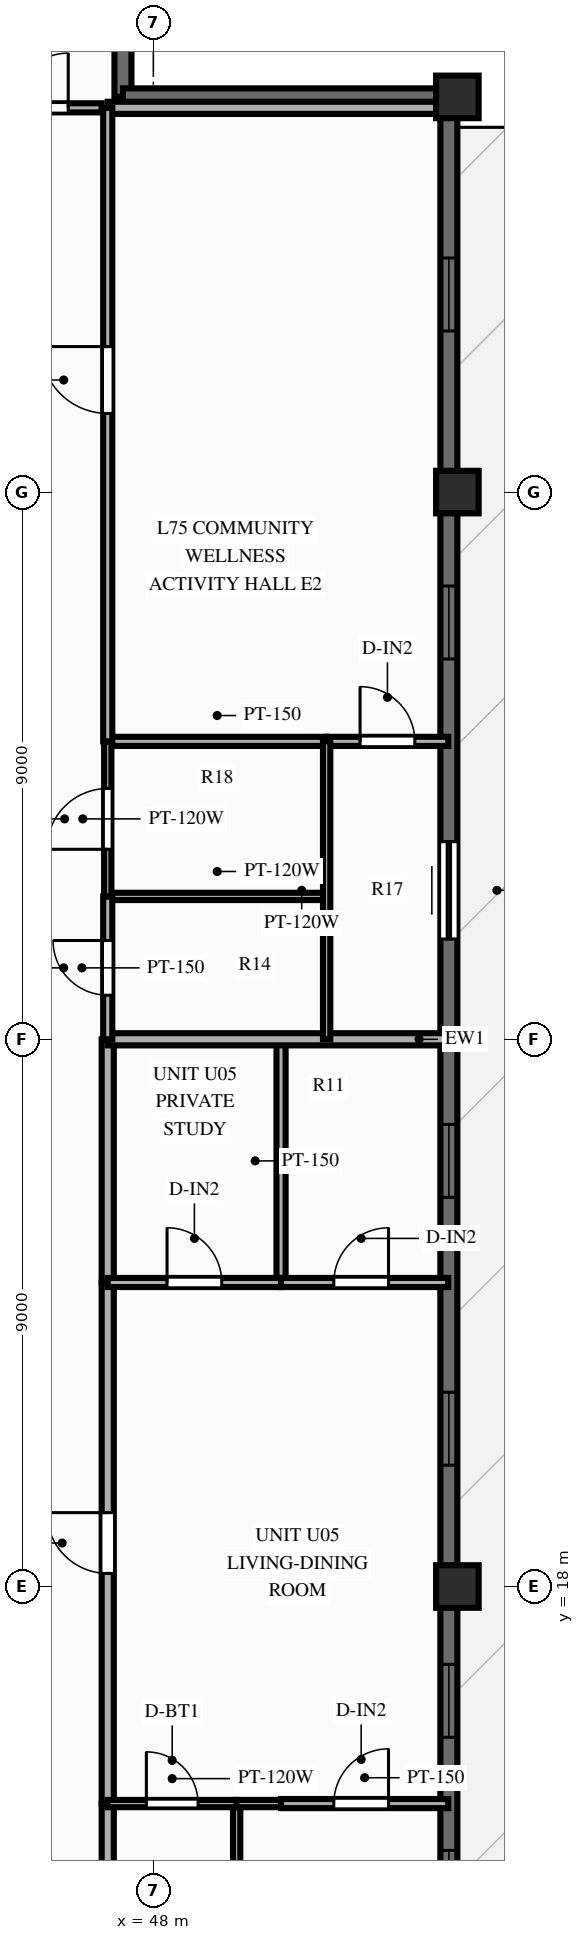
"""IFC4 building model, lengths in metres.
Left out: names, types, materials, properties, quantities, classifications, styles, units other than length and angle.
Written with IfcOpenShell. Run it as: python <this file> out.ifc"""

import sys

from ifc_helpers import new_model, si_unit, direction, frame, frame_2d, origin, origin_2d, place, context, subcontext, project, spatial, rectangle, extrude, source, transform, mapped, element, fill, save


model = new_model("IFC4")
c1 = context("Model", 3, precision=1e-05, world=origin(), true_north=direction((0.0, 1.0)))
c2 = subcontext(c1, "Body", "Model", "MODEL_VIEW")
j1 = project(units=[si_unit("LENGTHUNIT", "METRE"), si_unit("PLANEANGLEUNIT", "RADIAN")], contexts=[c1])
p1 = place(None, origin())
s1 = spatial("IfcSite", under=j1, at=p1, CompositionType="ELEMENT")
p2 = place(p1, origin())
s2 = spatial("IfcBuilding", under=s1, at=p2, CompositionType="ELEMENT")
p3 = place(p2, frame((0.0, 0.0, 243.0)))
s3 = spatial("IfcBuildingStorey", under=s2, at=p3, CompositionType="ELEMENT", Elevation=243.0)
m1 = source(origin(), c2, "Body", "SweptSolid", [
    extrude(rectangle(XDim=0.7, YDim=0.7, at=origin_2d()), origin(), (0.0, 0.0, 1.0), 3.0),
])
for number, where, z_axis, x_axis in (
    (1, (53.0, 18.0, 0.0), (0.0, 0.0, 1.0), (1.0, 0.0, 0.0)),
    (2, (53.0, 36.0, 0.0), (0.0, 0.0, 1.0), (1.0, 0.0, 0.0)),
    (3, (53.0, 42.5, 0.0), (0.0, 0.0, 1.0), (1.0, 0.0, 0.0)),
):
    element("IfcColumn", number, at=place(p3, frame(where, z_axis=z_axis, x_axis=x_axis)), inside=s3, PredefinedType="COLUMN", context=c2, shape_type="MappedRepresentation", body=[
        mapped(m1, transform((0.0, 0.0, 0.0), scale=1.0)),
    ])
p4 = place(p3, frame((52.86, 11.5, 0.0), z_axis=(0.0, 0.0, 1.0), x_axis=(0.0, 1.0, 0.0)))
e4 = element("IfcWall", 4, at=p4, inside=s3, PredefinedType="SOLIDWALL", context=c2, shape_type="SweptSolid", body=[
    extrude(rectangle(XDim=31.0, YDim=0.28, at=frame_2d((15.5, 0.0))), origin(), (0.0, 0.0, 1.0), 2.28),
])
p5 = place(p4, frame((0.96, 0.0, 0.25)))
e5 = element("IfcOpeningElement", 5, at=p5, cuts=e4, PredefinedType="OPENING", context=c2, shape_type="SweptSolid", body=[
    extrude(rectangle(XDim=1.2, YDim=1.5, at=frame_2d((0.6, 0.75))), frame((0.0, 0.152, 0.0), z_axis=(0.0, -1.0, 0.0), x_axis=(1.0, 0.0, 0.0)), (0.0, 0.0, 1.0), 0.304),
])
p6 = place(p4, frame((4.02, 0.0, 0.25)))
e6 = element("IfcOpeningElement", 6, at=p6, cuts=e4, PredefinedType="OPENING", context=c2, shape_type="SweptSolid", body=[
    extrude(rectangle(XDim=1.2, YDim=1.5, at=frame_2d((0.6, 0.75))), frame((0.0, 0.152, 0.0), z_axis=(0.0, -1.0, 0.0), x_axis=(1.0, 0.0, 0.0)), (0.0, 0.0, 1.0), 0.304),
])
p7 = place(p4, frame((8.495, 0.0, 0.25)))
e7 = element("IfcOpeningElement", 7, at=p7, cuts=e4, PredefinedType="OPENING", context=c2, shape_type="SweptSolid", body=[
    extrude(rectangle(XDim=1.2, YDim=1.5, at=frame_2d((0.6, 0.75))), frame((0.0, 0.152, 0.0), z_axis=(0.0, -1.0, 0.0), x_axis=(1.0, 0.0, 0.0)), (0.0, 0.0, 1.0), 0.304),
])
p8 = place(p4, frame((12.9, 0.0, 0.25)))
e8 = element("IfcOpeningElement", 8, at=p8, cuts=e4, PredefinedType="OPENING", context=c2, shape_type="SweptSolid", body=[
    extrude(rectangle(XDim=1.2, YDim=1.5, at=frame_2d((0.6, 0.75))), frame((0.0, 0.152, 0.0), z_axis=(0.0, -1.0, 0.0), x_axis=(1.0, 0.0, 0.0)), (0.0, 0.0, 1.0), 0.304),
])
p9 = place(p4, frame((18.75, 0.0, 0.0), z_axis=(0.0, 0.0, 1.0), x_axis=(-1.0, 0.0, 0.0)))
e9 = element("IfcOpeningElement", 9, at=p9, cuts=e4, PredefinedType="OPENING", context=c2, shape_type="SweptSolid", body=[
    extrude(rectangle(XDim=1.6, YDim=2.15, at=frame_2d((0.8, 1.075))), frame((0.0, 0.152, 0.0), z_axis=(0.0, -1.0, 0.0), x_axis=(1.0, 0.0, 0.0)), (0.0, 0.0, 1.0), 0.304),
])
p10 = place(p4, frame((21.755, 0.0, 0.25)))
e10 = element("IfcOpeningElement", 10, at=p10, cuts=e4, PredefinedType="OPENING", context=c2, shape_type="SweptSolid", body=[
    extrude(rectangle(XDim=1.2, YDim=1.5, at=frame_2d((0.6, 0.75))), frame((0.0, 0.152, 0.0), z_axis=(0.0, -1.0, 0.0), x_axis=(1.0, 0.0, 0.0)), (0.0, 0.0, 1.0), 0.304),
])
p11 = place(p4, frame((27.15, 0.0, 0.25)))
e11 = element("IfcOpeningElement", 11, at=p11, cuts=e4, PredefinedType="OPENING", context=c2, shape_type="SweptSolid", body=[
    extrude(rectangle(XDim=1.2, YDim=1.5, at=frame_2d((0.6, 0.75))), frame((0.0, 0.152, 0.0), z_axis=(0.0, -1.0, 0.0), x_axis=(1.0, 0.0, 0.0)), (0.0, 0.0, 1.0), 0.304),
])
for number, where, z_axis, x_axis in (
    (12, (47.5, 42.5, 0.0), (0.0, 0.0, 1.0), (0.0, 1.0, 0.0)),
    (13, (47.5, 42.5, 0.0), (0.0, 0.0, 1.0), (1.0, 0.0, 0.0)),
):
    element("IfcWall", number, at=place(p3, frame(where, z_axis=z_axis, x_axis=x_axis)), inside=s3, PredefinedType="SOLIDWALL", context=c2, shape_type="SweptSolid", body=[
        extrude(rectangle(XDim=5.42, YDim=0.28, at=frame_2d((2.71, 0.0))), origin(), (0.0, 0.0, 1.0), 2.28),
    ])
p12 = place(p3, frame((44.82, 42.32, 0.0), z_axis=(0.0, 0.0, 1.0), x_axis=(1.0, 0.0, 0.0)))
e14 = element("IfcWall", 14, at=p12, inside=s3, PredefinedType="PARTITIONING", context=c2, shape_type="SweptSolid", body=[
    extrude(rectangle(XDim=2.33, YDim=0.15, at=frame_2d((1.165, 0.0))), origin(), (0.0, 0.0, 1.0), 2.79),
])
p13 = place(p12, frame((0.88, 0.0, 0.0)))
e15 = element("IfcOpeningElement", 15, at=p13, cuts=e14, PredefinedType="OPENING", context=c2, shape_type="SweptSolid", body=[
    extrude(rectangle(XDim=0.9, YDim=2.1, at=frame_2d((0.45, 1.05))), frame((0.0, 0.087, 0.0), z_axis=(0.0, -1.0, 0.0), x_axis=(1.0, 0.0, 0.0)), (0.0, 0.0, 1.0), 0.174),
])
p14 = place(p3, frame((47.25, 42.32, 0.0), z_axis=(0.0, 0.0, 1.0), x_axis=(1.0, 0.0, 0.0)))
e16 = element("IfcWall", 16, at=p14, inside=s3, PredefinedType="PARTITIONING", context=c2, shape_type="SweptSolid", body=[
    extrude(rectangle(XDim=5.6, YDim=0.2, at=frame_2d((2.8, 0.0))), origin(), (0.0, 0.0, 1.0), 2.79),
])
p15 = place(p3, frame((47.25, 11.68, 0.0), z_axis=(0.0, 0.0, 1.0), x_axis=(0.0, 1.0, 0.0)))
e17 = element("IfcWall", 17, at=p15, inside=s3, PredefinedType="PARTITIONING", context=c2, shape_type="SweptSolid", body=[
    extrude(rectangle(XDim=2.75, YDim=0.2, at=frame_2d((1.375, 0.0))), origin(), (0.0, 0.0, 1.0), 2.79),
])
p16 = place(p3, frame((47.25, 14.43, 0.0), z_axis=(0.0, 0.0, 1.0), x_axis=(0.0, 1.0, 0.0)))
e18 = element("IfcWall", 18, at=p16, inside=s3, PredefinedType="PARTITIONING", context=c2, shape_type="SweptSolid", body=[
    extrude(rectangle(XDim=8.57, YDim=0.2, at=frame_2d((4.285, 0.0))), origin(), (0.0, 0.0, 1.0), 2.79),
])
p17 = place(p16, frame((3.785, 0.0, 0.0)))
e19 = element("IfcOpeningElement", 19, at=p17, cuts=e18, PredefinedType="OPENING", context=c2, shape_type="SweptSolid", body=[
    extrude(rectangle(XDim=1.0, YDim=2.15, at=frame_2d((0.5, 1.075))), frame((0.0, 0.112, 0.0), z_axis=(0.0, -1.0, 0.0), x_axis=(1.0, 0.0, 0.0)), (0.0, 0.0, 1.0), 0.224),
])
p18 = place(p3, frame((47.25, 23.0, 0.0), z_axis=(0.0, 0.0, 1.0), x_axis=(0.0, 1.0, 0.0)))
e20 = element("IfcWall", 20, at=p18, inside=s3, PredefinedType="PARTITIONING", context=c2, shape_type="SweptSolid", body=[
    extrude(rectangle(XDim=4.0, YDim=0.2, at=frame_2d((2.0, 0.0))), origin(), (0.0, 0.0, 1.0), 2.79),
])
p19 = place(p3, frame((49.37, 11.68, 0.0), z_axis=(0.0, 0.0, 1.0), x_axis=(0.0, 1.0, 0.0)))
e21 = element("IfcWall", 21, at=p19, inside=s3, PredefinedType="PARTITIONING", context=c2, shape_type="SweptSolid", body=[
    extrude(rectangle(XDim=2.75, YDim=0.12, at=frame_2d((1.375, 0.0))), origin(), (0.0, 0.0, 1.0), 2.79),
])
p20 = place(p3, frame((50.1, 23.0, 0.0), z_axis=(0.0, 0.0, 1.0), x_axis=(0.0, 1.0, 0.0)))
e22 = element("IfcWall", 22, at=p20, inside=s3, PredefinedType="PARTITIONING", context=c2, shape_type="SweptSolid", body=[
    extrude(rectangle(XDim=4.0, YDim=0.15, at=frame_2d((2.0, 0.0))), origin(), (0.0, 0.0, 1.0), 2.79),
])
p21 = place(p3, frame((47.25, 14.43, 0.0), z_axis=(0.0, 0.0, 1.0), x_axis=(1.0, 0.0, 0.0)))
e23 = element("IfcWall", 23, at=p21, inside=s3, PredefinedType="PARTITIONING", context=c2, shape_type="SweptSolid", body=[
    extrude(rectangle(XDim=2.12, YDim=0.12, at=frame_2d((1.06, 0.0))), origin(), (0.0, 0.0, 1.0), 2.79),
])
p22 = place(p21, frame((0.635, 0.0, 0.0)))
e24 = element("IfcOpeningElement", 24, at=p22, cuts=e23, PredefinedType="OPENING", context=c2, shape_type="SweptSolid", body=[
    extrude(rectangle(XDim=0.85, YDim=2.05, at=frame_2d((0.425, 1.025))), frame((0.0, 0.072, 0.0), z_axis=(0.0, -1.0, 0.0), x_axis=(1.0, 0.0, 0.0)), (0.0, 0.0, 1.0), 0.144),
])
p23 = place(p3, frame((49.37, 14.43, 0.0), z_axis=(0.0, 0.0, 1.0), x_axis=(1.0, 0.0, 0.0)))
e25 = element("IfcWall", 25, at=p23, inside=s3, PredefinedType="PARTITIONING", context=c2, shape_type="SweptSolid", body=[
    extrude(rectangle(XDim=0.73, YDim=0.12, at=frame_2d((0.365, 0.0))), origin(), (0.0, 0.0, 1.0), 2.79),
])
p24 = place(p3, frame((50.1, 14.43, 0.0), z_axis=(0.0, 0.0, 1.0), x_axis=(1.0, 0.0, 0.0)))
e26 = element("IfcWall", 26, at=p24, inside=s3, PredefinedType="PARTITIONING", context=c2, shape_type="SweptSolid", body=[
    extrude(rectangle(XDim=2.75, YDim=0.15, at=frame_2d((1.375, 0.0))), origin(), (0.0, 0.0, 1.0), 2.79),
])
p25 = place(p24, frame((0.868, 0.0, 0.0)))
e27 = element("IfcOpeningElement", 27, at=p25, cuts=e26, PredefinedType="OPENING", context=c2, shape_type="SweptSolid", body=[
    extrude(rectangle(XDim=0.9, YDim=2.1, at=frame_2d((0.45, 1.05))), frame((0.0, 0.087, 0.0), z_axis=(0.0, -1.0, 0.0), x_axis=(1.0, 0.0, 0.0)), (0.0, 0.0, 1.0), 0.174),
])
p26 = place(p3, frame((47.25, 23.0, 0.0), z_axis=(0.0, 0.0, 1.0), x_axis=(1.0, 0.0, 0.0)))
e28 = element("IfcWall", 28, at=p26, inside=s3, PredefinedType="PARTITIONING", context=c2, shape_type="SweptSolid", body=[
    extrude(rectangle(XDim=2.85, YDim=0.15, at=frame_2d((1.425, 0.0))), origin(), (0.0, 0.0, 1.0), 2.79),
])
p27 = place(p26, frame((0.975, 0.0, 0.0)))
e29 = element("IfcOpeningElement", 29, at=p27, cuts=e28, PredefinedType="OPENING", context=c2, shape_type="SweptSolid", body=[
    extrude(rectangle(XDim=0.9, YDim=2.1, at=frame_2d((0.45, 1.05))), frame((0.0, 0.087, 0.0), z_axis=(0.0, -1.0, 0.0), x_axis=(1.0, 0.0, 0.0)), (0.0, 0.0, 1.0), 0.174),
])
p28 = place(p3, frame((50.1, 23.0, 0.0), z_axis=(0.0, 0.0, 1.0), x_axis=(1.0, 0.0, 0.0)))
e30 = element("IfcWall", 30, at=p28, inside=s3, PredefinedType="PARTITIONING", context=c2, shape_type="SweptSolid", body=[
    extrude(rectangle(XDim=2.75, YDim=0.15, at=frame_2d((1.375, 0.0))), origin(), (0.0, 0.0, 1.0), 2.79),
])
p29 = place(p28, frame((0.868, 0.0, 0.0)))
e31 = element("IfcOpeningElement", 31, at=p29, cuts=e30, PredefinedType="OPENING", context=c2, shape_type="SweptSolid", body=[
    extrude(rectangle(XDim=0.9, YDim=2.1, at=frame_2d((0.45, 1.05))), frame((0.0, 0.087, 0.0), z_axis=(0.0, -1.0, 0.0), x_axis=(1.0, 0.0, 0.0)), (0.0, 0.0, 1.0), 0.174),
])
p30 = place(p3, frame((47.25, 27.0, 0.0), z_axis=(0.0, 0.0, 1.0), x_axis=(1.0, 0.0, 0.0)))
e32 = element("IfcWall", 32, at=p30, inside=s3, PredefinedType="PARTITIONING", context=c2, shape_type="SweptSolid", body=[
    extrude(rectangle(XDim=5.6, YDim=0.2, at=frame_2d((2.8, 0.0))), origin(), (0.0, 0.0, 1.0), 2.79),
])
p31 = place(p3, frame((47.25, 29.35, 0.0), z_axis=(0.0, 0.0, 1.0), x_axis=(1.0, 0.0, 0.0)))
e33 = element("IfcWall", 33, at=p31, inside=s3, PredefinedType="PARTITIONING", context=c2, shape_type="SweptSolid", body=[
    extrude(rectangle(XDim=3.6, YDim=0.12, at=frame_2d((1.8, 0.0))), origin(), (0.0, 0.0, 1.0), 2.79),
])
p32 = place(p3, frame((47.25, 31.9, 0.0), z_axis=(0.0, 0.0, 1.0), x_axis=(1.0, 0.0, 0.0)))
e34 = element("IfcWall", 34, at=p32, inside=s3, PredefinedType="PARTITIONING", context=c2, shape_type="SweptSolid", body=[
    extrude(rectangle(XDim=3.6, YDim=0.15, at=frame_2d((1.8, 0.0))), origin(), (0.0, 0.0, 1.0), 2.39),
])
p33 = place(p3, frame((50.85, 31.9, 0.0), z_axis=(0.0, 0.0, 1.0), x_axis=(1.0, 0.0, 0.0)))
e35 = element("IfcWall", 35, at=p33, inside=s3, PredefinedType="PARTITIONING", context=c2, shape_type="SweptSolid", body=[
    extrude(rectangle(XDim=2.0, YDim=0.15, at=frame_2d((1.0, 0.0))), origin(), (0.0, 0.0, 1.0), 2.39),
])
p34 = place(p33, frame((0.55, 0.0, 0.0)))
e36 = element("IfcOpeningElement", 36, at=p34, cuts=e35, PredefinedType="OPENING", context=c2, shape_type="SweptSolid", body=[
    extrude(rectangle(XDim=0.9, YDim=2.1, at=frame_2d((0.45, 1.05))), frame((0.0, 0.087, 0.0), z_axis=(0.0, -1.0, 0.0), x_axis=(1.0, 0.0, 0.0)), (0.0, 0.0, 1.0), 0.174),
])
p35 = place(p3, frame((50.85, 27.0, 0.0), z_axis=(0.0, 0.0, 1.0), x_axis=(0.0, 1.0, 0.0)))
e37 = element("IfcWall", 37, at=p35, inside=s3, PredefinedType="PARTITIONING", context=c2, shape_type="SweptSolid", body=[
    extrude(rectangle(XDim=4.9, YDim=0.12, at=frame_2d((2.45, 0.0))), origin(), (0.0, 0.0, 1.0), 2.79),
])
p36 = place(p3, frame((47.25, 27.0, 0.0), z_axis=(0.0, 0.0, 1.0), x_axis=(0.0, 1.0, 0.0)))
e38 = element("IfcWall", 38, at=p36, inside=s3, PredefinedType="PARTITIONING", context=c2, shape_type="SweptSolid", body=[
    extrude(rectangle(XDim=2.35, YDim=0.15, at=frame_2d((1.175, 0.0))), origin(), (0.0, 0.0, 1.0), 2.79),
])
p37 = place(p36, frame((0.725, 0.0, 0.0)))
e39 = element("IfcOpeningElement", 39, at=p37, cuts=e38, PredefinedType="OPENING", context=c2, shape_type="SweptSolid", body=[
    extrude(rectangle(XDim=0.9, YDim=2.1, at=frame_2d((0.45, 1.05))), frame((0.0, 0.087, 0.0), z_axis=(0.0, -1.0, 0.0), x_axis=(1.0, 0.0, 0.0)), (0.0, 0.0, 1.0), 0.174),
])
p38 = place(p3, frame((47.25, 29.35, 0.0), z_axis=(0.0, 0.0, 1.0), x_axis=(0.0, 1.0, 0.0)))
e40 = element("IfcWall", 40, at=p38, inside=s3, PredefinedType="PARTITIONING", context=c2, shape_type="SweptSolid", body=[
    extrude(rectangle(XDim=2.55, YDim=0.12, at=frame_2d((1.275, 0.0))), origin(), (0.0, 0.0, 1.0), 2.79),
])
p39 = place(p38, frame((0.775, 0.0, 0.0)))
e41 = element("IfcOpeningElement", 41, at=p39, cuts=e40, PredefinedType="OPENING", context=c2, shape_type="SweptSolid", body=[
    extrude(rectangle(XDim=1.0, YDim=2.1, at=frame_2d((0.5, 1.05))), frame((0.0, 0.072, 0.0), z_axis=(0.0, -1.0, 0.0), x_axis=(1.0, 0.0, 0.0)), (0.0, 0.0, 1.0), 0.144),
])
p40 = place(p3, frame((47.25, 31.9, 0.0), z_axis=(0.0, 0.0, 1.0), x_axis=(0.0, 1.0, 0.0)))
e42 = element("IfcWall", 42, at=p40, inside=s3, PredefinedType="PARTITIONING", context=c2, shape_type="SweptSolid", body=[
    extrude(rectangle(XDim=10.42, YDim=0.15, at=frame_2d((5.21, 0.0))), origin(), (0.0, 0.0, 1.0), 2.79),
])
p41 = place(p40, frame((5.393, 0.0, 0.0)))
e43 = element("IfcOpeningElement", 43, at=p41, cuts=e42, PredefinedType="OPENING", context=c2, shape_type="SweptSolid", body=[
    extrude(rectangle(XDim=1.1, YDim=2.15, at=frame_2d((0.55, 1.075))), frame((0.0, 0.087, 0.0), z_axis=(0.0, -1.0, 0.0), x_axis=(1.0, 0.0, 0.0)), (0.0, 0.0, 1.0), 0.174),
])
m2 = source(origin(), c2, "Body", "SweptSolid", [
    extrude(rectangle(XDim=1.2, YDim=1.5, at=frame_2d((0.6, 0.75))), frame((0.0, 0.03, 0.0), z_axis=(0.0, -1.0, 0.0), x_axis=(1.0, 0.0, 0.0)), (0.0, 0.0, 1.0), 0.06),
])
p42 = place(p5, origin())
e44 = element("IfcWindow", 44, at=p42, inside=s3, PartitioningType="SINGLE_PANEL", PredefinedType="WINDOW", context=c2, shape_type="MappedRepresentation", body=[
    mapped(m2, transform((0.0, 0.0, 0.0), scale=1.0)),
])
fill(e5, e44)
p43 = place(p6, origin())
e45 = element("IfcWindow", 45, at=p43, inside=s3, PartitioningType="SINGLE_PANEL", PredefinedType="WINDOW", context=c2, shape_type="MappedRepresentation", body=[
    mapped(m2, transform((0.0, 0.0, 0.0), scale=1.0)),
])
fill(e6, e45)
p44 = place(p7, origin())
e46 = element("IfcWindow", 46, at=p44, inside=s3, PartitioningType="SINGLE_PANEL", PredefinedType="WINDOW", context=c2, shape_type="MappedRepresentation", body=[
    mapped(m2, transform((0.0, 0.0, 0.0), scale=1.0)),
])
fill(e7, e46)
p45 = place(p8, origin())
e47 = element("IfcWindow", 47, at=p45, inside=s3, PartitioningType="SINGLE_PANEL", PredefinedType="WINDOW", context=c2, shape_type="MappedRepresentation", body=[
    mapped(m2, transform((0.0, 0.0, 0.0), scale=1.0)),
])
fill(e8, e47)
m3 = source(origin(), c2, "Body", "SweptSolid", [
    extrude(rectangle(XDim=1.6, YDim=2.15, at=frame_2d((0.8, 1.075))), frame((0.0, 0.025, 0.0), z_axis=(0.0, -1.0, 0.0), x_axis=(1.0, 0.0, 0.0)), (0.0, 0.0, 1.0), 0.05),
])
p46 = place(p9, origin())
e48 = element("IfcDoor", 48, at=p46, inside=s3, OperationType="SLIDING_TO_LEFT", PredefinedType="DOOR", context=c2, shape_type="MappedRepresentation", body=[
    mapped(m3, transform((0.0, 0.0, 0.0), scale=1.0)),
])
fill(e9, e48)
p47 = place(p10, origin())
e49 = element("IfcWindow", 49, at=p47, inside=s3, PartitioningType="SINGLE_PANEL", PredefinedType="WINDOW", context=c2, shape_type="MappedRepresentation", body=[
    mapped(m2, transform((0.0, 0.0, 0.0), scale=1.0)),
])
fill(e10, e49)
p48 = place(p11, origin())
e50 = element("IfcWindow", 50, at=p48, inside=s3, PartitioningType="SINGLE_PANEL", PredefinedType="WINDOW", context=c2, shape_type="MappedRepresentation", body=[
    mapped(m2, transform((0.0, 0.0, 0.0), scale=1.0)),
])
fill(e11, e50)
m4 = source(origin(), c2, "Body", "SweptSolid", [
    extrude(rectangle(XDim=0.9, YDim=2.1, at=frame_2d((0.45, 1.05))), frame((0.0, 0.025, 0.0), z_axis=(0.0, -1.0, 0.0), x_axis=(1.0, 0.0, 0.0)), (0.0, 0.0, 1.0), 0.05),
])
p49 = place(p13, origin())
e51 = element("IfcDoor", 51, at=p49, inside=s3, OperationType="SINGLE_SWING_RIGHT", PredefinedType="DOOR", context=c2, shape_type="MappedRepresentation", body=[
    mapped(m4, transform((0.0, 0.0, 0.0), scale=1.0)),
])
fill(e15, e51)
m5 = source(origin(), c2, "Body", "SweptSolid", [
    extrude(rectangle(XDim=1.0, YDim=2.15, at=frame_2d((0.5, 1.075))), frame((0.0, 0.025, 0.0), z_axis=(0.0, -1.0, 0.0), x_axis=(1.0, 0.0, 0.0)), (0.0, 0.0, 1.0), 0.05),
])
p50 = place(p17, origin())
e52 = element("IfcDoor", 52, at=p50, inside=s3, OperationType="SINGLE_SWING_RIGHT", PredefinedType="DOOR", context=c2, shape_type="MappedRepresentation", body=[
    mapped(m5, transform((0.0, 0.0, 0.0), scale=1.0)),
])
fill(e19, e52)
m6 = source(origin(), c2, "Body", "SweptSolid", [
    extrude(rectangle(XDim=0.85, YDim=2.05, at=frame_2d((0.425, 1.025))), frame((0.0, 0.025, 0.0), z_axis=(0.0, -1.0, 0.0), x_axis=(1.0, 0.0, 0.0)), (0.0, 0.0, 1.0), 0.05),
])
p51 = place(p22, origin())
e53 = element("IfcDoor", 53, at=p51, inside=s3, OperationType="SINGLE_SWING_LEFT", PredefinedType="DOOR", context=c2, shape_type="MappedRepresentation", body=[
    mapped(m6, transform((0.0, 0.0, 0.0), scale=1.0)),
])
fill(e24, e53)
p52 = place(p25, origin())
e54 = element("IfcDoor", 54, at=p52, inside=s3, OperationType="SINGLE_SWING_RIGHT", PredefinedType="DOOR", context=c2, shape_type="MappedRepresentation", body=[
    mapped(m4, transform((0.0, 0.0, 0.0), scale=1.0)),
])
fill(e27, e54)
p53 = place(p27, origin())
e55 = element("IfcDoor", 55, at=p53, inside=s3, OperationType="SINGLE_SWING_LEFT", PredefinedType="DOOR", context=c2, shape_type="MappedRepresentation", body=[
    mapped(m4, transform((0.0, 0.0, 0.0), scale=1.0)),
])
fill(e29, e55)
p54 = place(p29, origin())
e56 = element("IfcDoor", 56, at=p54, inside=s3, OperationType="SINGLE_SWING_RIGHT", PredefinedType="DOOR", context=c2, shape_type="MappedRepresentation", body=[
    mapped(m4, transform((0.0, 0.0, 0.0), scale=1.0)),
])
fill(e31, e56)
p55 = place(p34, origin())
e57 = element("IfcDoor", 57, at=p55, inside=s3, OperationType="SINGLE_SWING_LEFT", PredefinedType="DOOR", context=c2, shape_type="MappedRepresentation", body=[
    mapped(m4, transform((0.0, 0.0, 0.0), scale=1.0)),
])
fill(e36, e57)
p56 = place(p37, origin())
e58 = element("IfcDoor", 58, at=p56, inside=s3, OperationType="SINGLE_SWING_RIGHT", PredefinedType="DOOR", context=c2, shape_type="MappedRepresentation", body=[
    mapped(m4, transform((0.0, 0.0, 0.0), scale=1.0)),
])
fill(e39, e58)
m7 = source(origin(), c2, "Body", "SweptSolid", [
    extrude(rectangle(XDim=1.0, YDim=2.1, at=frame_2d((0.5, 1.05))), frame((0.0, 0.025, 0.0), z_axis=(0.0, -1.0, 0.0), x_axis=(1.0, 0.0, 0.0)), (0.0, 0.0, 1.0), 0.05),
])
p57 = place(p39, origin())
e59 = element("IfcDoor", 59, at=p57, inside=s3, OperationType="SINGLE_SWING_LEFT", PredefinedType="DOOR", context=c2, shape_type="MappedRepresentation", body=[
    mapped(m7, transform((0.0, 0.0, 0.0), scale=1.0)),
])
fill(e41, e59)
m8 = source(origin(), c2, "Body", "SweptSolid", [
    extrude(rectangle(XDim=1.1, YDim=2.15, at=frame_2d((0.55, 1.075))), frame((0.0, 0.025, 0.0), z_axis=(0.0, -1.0, 0.0), x_axis=(1.0, 0.0, 0.0)), (0.0, 0.0, 1.0), 0.05),
])
p58 = place(p41, origin())
e60 = element("IfcDoor", 60, at=p58, inside=s3, OperationType="SINGLE_SWING_RIGHT", PredefinedType="DOOR", context=c2, shape_type="MappedRepresentation", body=[
    mapped(m8, transform((0.0, 0.0, 0.0), scale=1.0)),
])
fill(e43, e60)
save(model, sys.argv[1])
